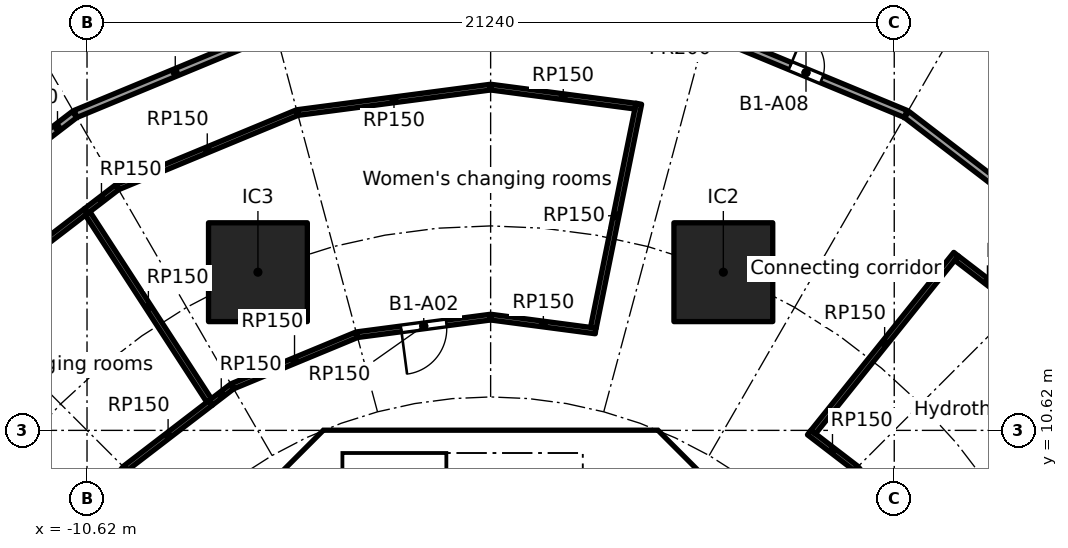
"""IFC4 building model, lengths in metres.
Left out: names, types, materials, properties, quantities, classifications, styles, units other than length and angle.
Written with IfcOpenShell. Run it as: python <this file> out.ifc"""

import sys

from ifc_helpers import new_model, si_unit, direction, frame, frame_2d, origin, origin_2d, place, context, subcontext, project, spatial, polyline, rectangle, outline, extrude, element, fill, save


model = new_model("IFC4")
c1 = context("Model", 3, precision=1e-05, world=origin(), true_north=direction((0.0, 1.0)))
c2 = subcontext(c1, "Body", "Model", "MODEL_VIEW")
j1 = project(units=[si_unit("LENGTHUNIT", "METRE"), si_unit("PLANEANGLEUNIT", "RADIAN")], contexts=[c1])
p1 = place(None, origin())
s1 = spatial("IfcSite", under=j1, at=p1, CompositionType="ELEMENT")
p2 = place(p1, origin())
s2 = spatial("IfcBuilding", under=s1, at=p2, CompositionType="ELEMENT")
p3 = place(p2, frame((0.0, 0.0, -5.0)))
s3 = spatial("IfcBuildingStorey", under=s2, at=p3, CompositionType="ELEMENT", Elevation=-5.0)
for number, where, z_axis, x_axis in (
    (1, (6.123, 14.782, 0.0), (0.0, 0.0, 1.0), (1.0, 0.0, 0.0)),
    (2, (-6.123, 14.782, 0.0), (0.0, 0.0, 1.0), (1.0, 0.0, 0.0)),
):
    element("IfcColumn", number, at=place(p3, frame(where, z_axis=z_axis, x_axis=x_axis)), inside=s3, PredefinedType="COLUMN", context=c2, shape_type="SweptSolid", body=[
        extrude(rectangle(XDim=2.6, YDim=2.6, at=origin_2d()), origin(), (0.0, 0.0, 1.0), 5.0),
    ])
p4 = place(p3, frame((9.988, 4.613, 0.0), z_axis=(0.0, 0.0, 1.0), x_axis=(-0.707106781187, 0.707106781187, 0.0)))
e3 = element("IfcWall", 3, at=p4, inside=s3, PredefinedType="SHEAR", context=c2, shape_type="SweptSolid", body=[
    extrude(rectangle(XDim=7.602, YDim=0.6, at=frame_2d((3.801, 0.0))), origin(), (0.0, 0.0, 1.0), 4.6),
])
p5 = place(p4, frame((3.201, 0.0, 0.0)))
e4 = element("IfcOpeningElement", 4, at=p5, cuts=e3, PredefinedType="OPENING", context=c2, shape_type="SweptSolid", body=[
    extrude(rectangle(XDim=1.2, YDim=2.1, at=frame_2d((0.6, 1.05))), frame((0.0, 0.31, 0.0), z_axis=(0.0, -1.0, 0.0), x_axis=(1.0, 0.0, 0.0)), (0.0, 0.0, 1.0), 0.62),
])
p6 = place(p3, frame((-4.613, 9.988, 0.0), z_axis=(0.0, 0.0, 1.0), x_axis=(-0.707106781187, -0.707106781187, 0.0)))
e5 = element("IfcWall", 5, at=p6, inside=s3, PredefinedType="SHEAR", context=c2, shape_type="SweptSolid", body=[
    extrude(rectangle(XDim=7.602, YDim=0.6, at=frame_2d((3.801, 0.0))), origin(), (0.0, 0.0, 1.0), 4.6),
])
p7 = place(p6, frame((0.351, 0.0, 0.0)))
e6 = element("IfcOpeningElement", 6, at=p7, cuts=e5, PredefinedType="OPENING", context=c2, shape_type="SweptSolid", body=[
    extrude(rectangle(XDim=1.1, YDim=2.1, at=frame_2d((0.55, 1.05))), frame((0.0, 0.31, 0.0), z_axis=(0.0, -1.0, 0.0), x_axis=(1.0, 0.0, 0.0)), (0.0, 0.0, 1.0), 0.62),
])
p8 = place(p3, frame((4.0, 7.025, 0.0), z_axis=(0.0, 0.0, 1.0), x_axis=(0.0, 1.0, 0.0)))
e7 = element("IfcWall", 7, at=p8, inside=s3, PredefinedType="SOLIDWALL", context=c2, shape_type="SweptSolid", body=[
    extrude(rectangle(XDim=3.0, YDim=0.2, at=frame_2d((1.5, 0.0))), origin(), (0.0, 0.0, 1.0), 4.6),
])
p9 = place(p8, frame((0.925, 0.0, 0.0)))
e8 = element("IfcOpeningElement", 8, at=p9, cuts=e7, PredefinedType="OPENING", context=c2, shape_type="SweptSolid", body=[
    extrude(rectangle(XDim=1.1, YDim=2.1, at=frame_2d((0.55, 1.05))), frame((0.0, 0.11, 0.0), z_axis=(0.0, -1.0, 0.0), x_axis=(1.0, 0.0, 0.0)), (0.0, 0.0, 1.0), 0.22),
])
p10 = place(p3, origin())
e9 = element("IfcWall", 9, at=p10, inside=s3, PredefinedType="SHEAR", context=c2, shape_type="SweptSolid", body=[
    extrude(outline(polyline([(-4.152, 10.025), (-4.401, 9.776), (-4.825, 10.2), (-4.401, 10.625), (4.401, 10.625), (4.825, 10.2), (4.401, 9.776), (4.152, 10.025), (-4.152, 10.025)])), origin(), (0.0, 0.0, 1.0), 4.6),
])
p11 = place(p3, origin())
e10 = element("IfcWall", 10, at=p11, inside=s3, PredefinedType="SOLIDWALL", context=c2, shape_type="SweptSolid", body=[
    extrude(outline(polyline([(-3.9, 7.025), (-4.1, 7.025), (-4.1, 10.025), (-3.9, 10.025), (-3.9, 7.025)])), origin(), (0.0, 0.0, 1.0), 4.6),
])
p12 = place(p3, frame((-11.771, 6.809, 0.0), z_axis=(0.0, 0.0, 1.0), x_axis=(0.608736710054, 0.793372307201, 0.0)))
e11 = element("IfcWall", 11, at=p12, inside=s3, PredefinedType="PARTITIONING", context=c2, shape_type="SweptSolid", body=[
    extrude(rectangle(XDim=3.527, YDim=0.15, at=frame_2d((1.763, 0.0))), origin(), (0.0, 0.0, 1.0), 4.6),
])
p13 = place(p12, frame((1.163, 0.0, 0.0)))
e12 = element("IfcOpeningElement", 12, at=p13, cuts=e11, PredefinedType="OPENING", context=c2, shape_type="SweptSolid", body=[
    extrude(rectangle(XDim=1.2, YDim=2.1, at=frame_2d((0.6, 1.05))), frame((0.0, 0.085, 0.0), z_axis=(0.0, -1.0, 0.0), x_axis=(1.0, 0.0, 0.0)), (0.0, 0.0, 1.0), 0.17),
])
p14 = place(p3, frame((-10.644, 16.391, 0.0), z_axis=(0.0, 0.0, 1.0), x_axis=(-0.793356294792, -0.608757578609, 0.0)))
e13 = element("IfcWall", 13, at=p14, inside=s3, PredefinedType="PARTITIONING", context=c2, shape_type="SweptSolid", body=[
    extrude(rectangle(XDim=4.087, YDim=0.15, at=frame_2d((2.043, 0.0))), origin(), (0.0, 0.0, 1.0), 4.6),
])
p15 = place(p3, frame((-9.835, 17.012, 0.0), z_axis=(0.0, 0.0, 1.0), x_axis=(-0.793344280216, -0.608773236147, 0.0)))
e14 = element("IfcWall", 14, at=p15, inside=s3, PredefinedType="PARTITIONING", context=c2, shape_type="SweptSolid", body=[
    extrude(rectangle(XDim=1.02, YDim=0.15, at=frame_2d((0.51, 0.0))), origin(), (0.0, 0.0, 1.0), 4.6),
])
p16 = place(p3, frame((-9.607, 9.624, 0.0), z_axis=(0.0, 0.0, 1.0), x_axis=(0.793375345407, 0.608732750311, 0.0)))
e15 = element("IfcWall", 15, at=p16, inside=s3, PredefinedType="PARTITIONING", context=c2, shape_type="SweptSolid", body=[
    extrude(rectangle(XDim=2.824, YDim=0.15, at=frame_2d((1.412, 0.0))), origin(), (0.0, 0.0, 1.0), 4.6),
])
p17 = place(p3, frame((-7.407, 11.406, 0.0), z_axis=(0.0, 0.0, 1.0), x_axis=(-0.544646109016, 0.838665973993, 0.0)))
e16 = element("IfcWall", 16, at=p17, inside=s3, PredefinedType="PARTITIONING", context=c2, shape_type="SweptSolid", body=[
    extrude(rectangle(XDim=5.868, YDim=0.15, at=frame_2d((2.934, 0.0))), origin(), (0.0, 0.0, 1.0), 4.6),
])
p18 = place(p3, frame((-7.366, 11.343, 0.0), z_axis=(0.0, 0.0, 1.0), x_axis=(0.793360087844, 0.608752635326, 0.0)))
e17 = element("IfcWall", 17, at=p18, inside=s3, PredefinedType="PARTITIONING", context=c2, shape_type="SweptSolid", body=[
    extrude(rectangle(XDim=0.702, YDim=0.15, at=frame_2d((0.351, 0.0))), origin(), (0.0, 0.0, 1.0), 4.6),
])
p19 = place(p3, frame((-6.789, 11.782, 0.0), z_axis=(0.0, 0.0, 1.0), x_axis=(0.923881838111, 0.382677866108, 0.0)))
e18 = element("IfcWall", 18, at=p19, inside=s3, PredefinedType="PARTITIONING", context=c2, shape_type="SweptSolid", body=[
    extrude(rectangle(XDim=3.527, YDim=0.15, at=frame_2d((1.763, 0.0))), origin(), (0.0, 0.0, 1.0), 4.6),
])
p20 = place(p3, frame((-5.097, 18.978, 0.0), z_axis=(0.0, 0.0, 1.0), x_axis=(-0.923883976017, -0.382672704618, 0.0)))
e19 = element("IfcWall", 19, at=p20, inside=s3, PredefinedType="PARTITIONING", context=c2, shape_type="SweptSolid", body=[
    extrude(rectangle(XDim=5.106, YDim=0.15, at=frame_2d((2.553, 0.0))), origin(), (0.0, 0.0, 1.0), 4.6),
])
p21 = place(p3, frame((-3.508, 13.138, 0.0), z_axis=(0.0, 0.0, 1.0), x_axis=(0.991448403586, 0.130499283623, 0.0)))
e20 = element("IfcWall", 20, at=p21, inside=s3, PredefinedType="PARTITIONING", context=c2, shape_type="SweptSolid", body=[
    extrude(rectangle(XDim=3.527, YDim=0.15, at=frame_2d((1.763, 0.0))), origin(), (0.0, 0.0, 1.0), 4.6),
])
p22 = place(p21, frame((1.163, 0.0, 0.0)))
e21 = element("IfcOpeningElement", 21, at=p22, cuts=e20, PredefinedType="OPENING", context=c2, shape_type="SweptSolid", body=[
    extrude(rectangle(XDim=1.2, YDim=2.1, at=frame_2d((0.6, 1.05))), frame((0.0, 0.085, 0.0), z_axis=(0.0, -1.0, 0.0), x_axis=(1.0, 0.0, 0.0)), (0.0, 0.0, 1.0), 0.17),
])
p23 = place(p3, frame((0.012, 13.598, 0.0), z_axis=(0.0, 0.0, 1.0), x_axis=(0.991448603925, -0.130497761571, 0.0)))
e22 = element("IfcWall", 22, at=p23, inside=s3, PredefinedType="PARTITIONING", context=c2, shape_type="SweptSolid", body=[
    extrude(rectangle(XDim=2.774, YDim=0.15, at=frame_2d((1.387, 0.0))), origin(), (0.0, 0.0, 1.0), 4.6),
])
p24 = place(p3, frame((-0.012, 19.65, 0.0), z_axis=(0.0, 0.0, 1.0), x_axis=(-0.991445342988, -0.130522533942, 0.0)))
e23 = element("IfcWall", 23, at=p24, inside=s3, PredefinedType="PARTITIONING", context=c2, shape_type="SweptSolid", body=[
    extrude(rectangle(XDim=5.106, YDim=0.15, at=frame_2d((2.553, 0.0))), origin(), (0.0, 0.0, 1.0), 4.6),
])
p25 = place(p3, frame((2.703, 13.32, 0.0), z_axis=(0.0, 0.0, 1.0), x_axis=(0.198863172252, 0.980027264275, 0.0)))
e24 = element("IfcWall", 24, at=p25, inside=s3, PredefinedType="PARTITIONING", context=c2, shape_type="SweptSolid", body=[
    extrude(rectangle(XDim=6.014, YDim=0.15, at=frame_2d((3.007, 0.0))), origin(), (0.0, 0.0, 1.0), 4.6),
])
p26 = place(p3, frame((3.81, 19.15, 0.0), z_axis=(0.0, 0.0, 1.0), x_axis=(-0.991452993905, 0.130464404636, 0.0)))
e25 = element("IfcWall", 25, at=p26, inside=s3, PredefinedType="PARTITIONING", context=c2, shape_type="SweptSolid", body=[
    extrude(rectangle(XDim=3.831, YDim=0.15, at=frame_2d((1.915, 0.0))), origin(), (0.0, 0.0, 1.0), 4.6),
])
p27 = place(p3, frame((8.382, 10.564, 0.0), z_axis=(0.0, 0.0, 1.0), x_axis=(0.793405235736, -0.608693791578, 0.0)))
e26 = element("IfcWall", 26, at=p27, inside=s3, PredefinedType="PARTITIONING", context=c2, shape_type="SweptSolid", body=[
    extrude(rectangle(XDim=1.544, YDim=0.15, at=frame_2d((0.772, 0.0))), origin(), (0.0, 0.0, 1.0), 4.6),
])
p28 = place(p3, frame((9.624, 9.607, 0.0), z_axis=(0.0, 0.0, 1.0), x_axis=(0.608736710054, -0.793372307201, 0.0)))
e27 = element("IfcWall", 27, at=p28, inside=s3, PredefinedType="PARTITIONING", context=c2, shape_type="SweptSolid", body=[
    extrude(rectangle(XDim=3.527, YDim=0.15, at=frame_2d((1.763, 0.0))), origin(), (0.0, 0.0, 1.0), 4.6),
])
p29 = place(p28, frame((0.863, 0.0, 0.0)))
e28 = element("IfcOpeningElement", 28, at=p29, cuts=e27, PredefinedType="OPENING", context=c2, shape_type="SweptSolid", body=[
    extrude(rectangle(XDim=1.8, YDim=2.1, at=frame_2d((0.9, 1.05))), frame((0.0, 0.085, 0.0), z_axis=(0.0, -1.0, 0.0), x_axis=(1.0, 0.0, 0.0)), (0.0, 0.0, 1.0), 0.17),
])
p30 = place(p3, frame((12.245, 15.257, 0.0), z_axis=(0.0, 0.0, 1.0), x_axis=(-0.625939450801, -0.779871658628, 0.0)))
e29 = element("IfcWall", 29, at=p30, inside=s3, PredefinedType="PARTITIONING", context=c2, shape_type="SweptSolid", body=[
    extrude(rectangle(XDim=6.001, YDim=0.15, at=frame_2d((3.001, 0.0))), origin(), (0.0, 0.0, 1.0), 4.6),
])
p31 = place(p3, frame((13.886, 13.903, 0.0), z_axis=(0.0, 0.0, 1.0), x_axis=(-0.793344054907, 0.608773529766, 0.0)))
e30 = element("IfcWall", 30, at=p31, inside=s3, PredefinedType="PARTITIONING", context=c2, shape_type="SweptSolid", body=[
    extrude(rectangle(XDim=2.053, YDim=0.15, at=frame_2d((1.026, 0.0))), origin(), (0.0, 0.0, 1.0), 4.6),
])
p32 = place(p3, frame((-11.846, 18.242, 0.0), z_axis=(0.0, 0.0, 1.0), x_axis=(0.793304484718, 0.608825093542, 0.0)))
e31 = element("IfcWall", 31, at=p32, inside=s3, PredefinedType="PARTITIONING", context=c2, shape_type="SweptSolid", body=[
    extrude(rectangle(XDim=1.133, YDim=0.2, at=frame_2d((0.566, 0.0))), origin(), (0.0, 0.0, 1.0), 4.6),
])
p33 = place(p3, frame((-10.921, 18.946, 0.0), z_axis=(0.0, 0.0, 1.0), x_axis=(0.923877460413, 0.382688434814, 0.0)))
e32 = element("IfcWall", 32, at=p33, inside=s3, PredefinedType="PARTITIONING", context=c2, shape_type="SweptSolid", body=[
    extrude(rectangle(XDim=5.679, YDim=0.2, at=frame_2d((2.84, 0.0))), origin(), (0.0, 0.0, 1.0), 4.6),
])
p34 = place(p3, frame((5.675, 21.12, 0.0), z_axis=(0.0, 0.0, 1.0), x_axis=(0.923877460413, -0.382688434814, 0.0)))
e33 = element("IfcWall", 33, at=p34, inside=s3, PredefinedType="PARTITIONING", context=c2, shape_type="SweptSolid", body=[
    extrude(rectangle(XDim=5.679, YDim=0.2, at=frame_2d((2.84, 0.0))), origin(), (0.0, 0.0, 1.0), 4.6),
])
p35 = place(p34, frame((2.389, 0.0, 0.0)))
e34 = element("IfcOpeningElement", 34, at=p35, cuts=e33, PredefinedType="OPENING", context=c2, shape_type="SweptSolid", body=[
    extrude(rectangle(XDim=0.9, YDim=2.1, at=frame_2d((0.45, 1.05))), frame((0.0, 0.11, 0.0), z_axis=(0.0, -1.0, 0.0), x_axis=(1.0, 0.0, 0.0)), (0.0, 0.0, 1.0), 0.22),
])
p36 = place(p3, frame((10.948, 18.931, 0.0), z_axis=(0.0, 0.0, 1.0), x_axis=(0.793337814523, -0.608781662049, 0.0)))
e35 = element("IfcWall", 35, at=p36, inside=s3, PredefinedType="PARTITIONING", context=c2, shape_type="SweptSolid", body=[
    extrude(rectangle(XDim=5.679, YDim=0.2, at=frame_2d((2.839, 0.0))), origin(), (0.0, 0.0, 1.0), 4.6),
])
p37 = place(p7, origin())
e36 = element("IfcDoor", 36, at=p37, inside=s3, OperationType="SINGLE_SWING_RIGHT", PredefinedType="DOOR", context=c2, shape_type="SweptSolid", body=[
    extrude(rectangle(XDim=1.1, YDim=2.1, at=frame_2d((0.55, 1.05))), frame((0.0, 0.025, 0.0), z_axis=(0.0, -1.0, 0.0), x_axis=(1.0, 0.0, 0.0)), (0.0, 0.0, 1.0), 0.05),
])
fill(e6, e36)
p38 = place(p22, frame((1.2, 0.0, 0.0), x_axis=(-1.0, 0.0, 0.0)))
e37 = element("IfcDoor", 37, at=p38, inside=s3, OperationType="SINGLE_SWING_RIGHT", PredefinedType="DOOR", context=c2, shape_type="SweptSolid", body=[
    extrude(rectangle(XDim=1.2, YDim=2.1, at=frame_2d((0.6, 1.05))), frame((0.0, 0.025, 0.0), z_axis=(0.0, -1.0, 0.0), x_axis=(1.0, 0.0, 0.0)), (0.0, 0.0, 1.0), 0.05),
])
fill(e21, e37)
p39 = place(p35, origin())
e38 = element("IfcDoor", 38, at=p39, inside=s3, OperationType="SINGLE_SWING_LEFT", PredefinedType="DOOR", context=c2, shape_type="SweptSolid", body=[
    extrude(rectangle(XDim=0.9, YDim=2.1, at=frame_2d((0.45, 1.05))), frame((0.0, 0.025, 0.0), z_axis=(0.0, -1.0, 0.0), x_axis=(1.0, 0.0, 0.0)), (0.0, 0.0, 1.0), 0.05),
])
fill(e34, e38)
save(model, sys.argv[1])
